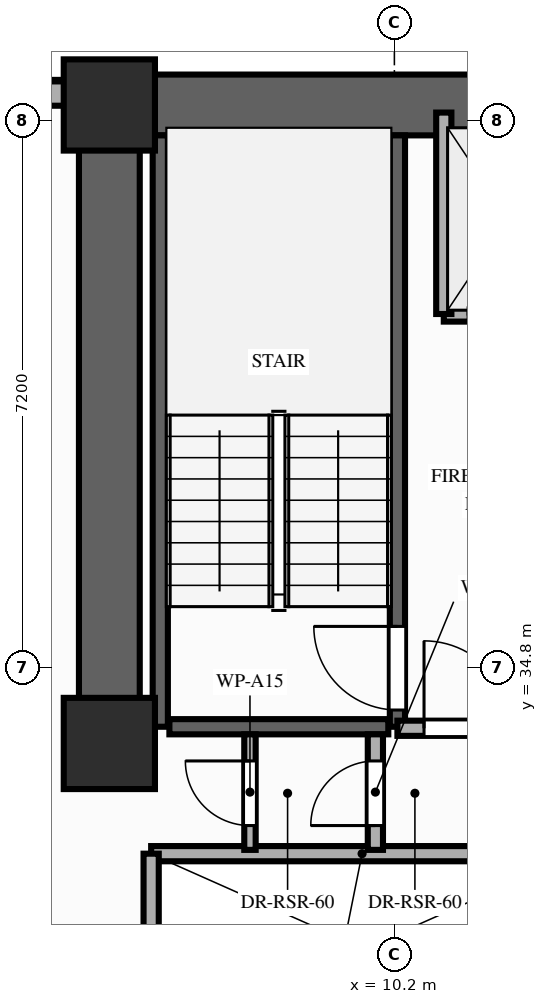
"""IFC4 building model, lengths in metres.
Left out: names, types, materials, properties, quantities, classifications, styles, units other than length and angle.
Written with IfcOpenShell. Run it as: python <this file> out.ifc"""

import sys

from ifc_helpers import new_model, si_unit, direction, frame, frame_2d, origin, origin_2d, place, context, subcontext, project, spatial, rectangle, extrude, element, fill, save


model = new_model("IFC4")
c1 = context("Model", 3, precision=1e-05, world=origin(), true_north=direction((0.0, 1.0)))
c2 = subcontext(c1, "Body", "Model", "MODEL_VIEW")
j1 = project(units=[si_unit("LENGTHUNIT", "METRE"), si_unit("PLANEANGLEUNIT", "RADIAN")], contexts=[c1])
p1 = place(None, origin())
s1 = spatial("IfcSite", under=j1, at=p1, CompositionType="ELEMENT")
p2 = place(p1, origin())
s2 = spatial("IfcBuilding", under=s1, at=p2, CompositionType="ELEMENT")
p3 = place(p2, frame((0.0, 0.0, 93.0)))
s3 = spatial("IfcBuildingStorey", under=s2, at=p3, CompositionType="ELEMENT", Elevation=93.0)
for number, where, z_axis, x_axis in (
    (1, (6.45, 33.8, 0.0), (0.0, 0.0, 1.0), (1.0, 0.0, 0.0)),
    (2, (6.45, 42.2, 0.0), (0.0, 0.0, 1.0), (1.0, 0.0, 0.0)),
):
    element("IfcColumn", number, at=place(p3, frame(where, z_axis=z_axis, x_axis=x_axis)), inside=s3, PredefinedType="COLUMN", context=c2, shape_type="SweptSolid", body=[
        extrude(rectangle(XDim=1.2, YDim=1.2, at=origin_2d()), origin(), (0.0, 0.0, 1.0), 3.2),
    ])
p4 = place(p3, frame((6.0, 42.35, 0.0), z_axis=(0.0, 0.0, 1.0), x_axis=(-1.0, 0.0, 0.0)))
e3 = element("IfcWall", 3, at=p4, inside=s3, PredefinedType="STANDARD", context=c2, shape_type="SweptSolid", body=[
    extrude(rectangle(XDim=2.0, YDim=0.32, at=frame_2d((1.0, 0.0))), origin(), (0.0, 0.0, 1.0), 3.02),
])
p5 = place(p3, frame((6.45, 42.2, 0.0), z_axis=(0.0, 0.0, 1.0), x_axis=(1.0, 0.0, 0.0)))
e4 = element("IfcWall", 4, at=p5, inside=s3, PredefinedType="SHEAR", context=c2, shape_type="SweptSolid", body=[
    extrude(rectangle(XDim=20.45, YDim=0.8, at=frame_2d((10.225, 0.0))), origin(), (0.0, 0.0, 1.0), 3.02),
])
p6 = place(p3, frame((6.45, 33.8, 0.0), z_axis=(0.0, 0.0, 1.0), x_axis=(0.0, 1.0, 0.0)))
e5 = element("IfcWall", 5, at=p6, inside=s3, PredefinedType="SHEAR", context=c2, shape_type="SweptSolid", body=[
    extrude(rectangle(XDim=7.95, YDim=0.8, at=frame_2d((3.975, 0.0))), origin(), (0.0, 0.0, 1.0), 3.02),
])
p7 = place(p3, frame((7.12, 34.02, 0.0), z_axis=(0.0, 0.0, 1.0), x_axis=(0.0, 1.0, 0.0)))
e6 = element("IfcWall", 6, at=p7, inside=s3, PredefinedType="SHEAR", context=c2, shape_type="SweptSolid", body=[
    extrude(rectangle(XDim=7.78, YDim=0.2, at=frame_2d((3.89, 0.0))), origin(), (0.0, 0.0, 1.0), 3.02),
])
p8 = place(p3, frame((10.24, 34.02, 0.0), z_axis=(0.0, 0.0, 1.0), x_axis=(0.0, 1.0, 0.0)))
e7 = element("IfcWall", 7, at=p8, inside=s3, PredefinedType="SHEAR", context=c2, shape_type="SweptSolid", body=[
    extrude(rectangle(XDim=7.78, YDim=0.2, at=frame_2d((3.89, 0.0))), origin(), (0.0, 0.0, 1.0), 3.02),
])
p9 = place(p8, frame((0.22, 0.0, 0.0)))
e8 = element("IfcOpeningElement", 8, at=p9, cuts=e7, PredefinedType="OPENING", context=c2, shape_type="SweptSolid", body=[
    extrude(rectangle(XDim=1.1, YDim=2.15, at=frame_2d((0.55, 1.075))), frame((0.0, 0.11, 0.0), z_axis=(0.0, -1.0, 0.0), x_axis=(1.0, 0.0, 0.0)), (0.0, 0.0, 1.0), 0.22),
])
p10 = place(p3, frame((7.24, 34.02, 0.0), z_axis=(0.0, 0.0, 1.0), x_axis=(1.0, 0.0, 0.0)))
e9 = element("IfcWall", 9, at=p10, inside=s3, PredefinedType="SHEAR", context=c2, shape_type="SweptSolid", body=[
    extrude(rectangle(XDim=2.88, YDim=0.2, at=frame_2d((1.44, 0.0))), origin(), (0.0, 0.0, 1.0), 3.02),
])
p11 = place(p3, frame((7.0, 32.35, 0.0), z_axis=(0.0, 0.0, 1.0), x_axis=(1.0, 0.0, 0.0)))
e10 = element("IfcWall", 10, at=p11, inside=s3, PredefinedType="MOVABLE", context=c2, shape_type="SweptSolid", body=[
    extrude(rectangle(XDim=5.55, YDim=0.2, at=frame_2d((2.775, 0.0))), origin(), (0.0, 0.0, 1.0), 3.02),
])
p12 = place(p3, frame((7.0, 29.85, 0.0), z_axis=(0.0, 0.0, 1.0), x_axis=(0.0, 1.0, 0.0)))
e11 = element("IfcWall", 11, at=p12, inside=s3, PredefinedType="MOVABLE", context=c2, shape_type="SweptSolid", body=[
    extrude(rectangle(XDim=2.5, YDim=0.2, at=frame_2d((1.25, 0.0))), origin(), (0.0, 0.0, 1.0), 3.02),
])
p13 = place(p3, frame((10.85, 39.45, 0.0), z_axis=(0.0, 0.0, 1.0), x_axis=(1.0, 0.0, 0.0)))
e12 = element("IfcWall", 12, at=p13, inside=s3, PredefinedType="MOVABLE", context=c2, shape_type="SweptSolid", body=[
    extrude(rectangle(XDim=1.7, YDim=0.2, at=frame_2d((0.85, 0.0))), origin(), (0.0, 0.0, 1.0), 3.02),
])
p14 = place(p13, frame((0.32, 0.0, 0.0)))
e13 = element("IfcOpeningElement", 13, at=p14, cuts=e12, PredefinedType="OPENING", context=c2, shape_type="SweptSolid", body=[
    extrude(rectangle(XDim=1.05, YDim=2.15, at=frame_2d((0.525, 1.075))), frame((0.0, 0.11, 0.0), z_axis=(0.0, -1.0, 0.0), x_axis=(1.0, 0.0, 0.0)), (0.0, 0.0, 1.0), 0.22),
])
p15 = place(p3, frame((10.85, 39.45, 0.0), z_axis=(0.0, 0.0, 1.0), x_axis=(0.0, 1.0, 0.0)))
e14 = element("IfcWall", 14, at=p15, inside=s3, PredefinedType="MOVABLE", context=c2, shape_type="SweptSolid", body=[
    extrude(rectangle(XDim=2.65, YDim=0.2, at=frame_2d((1.325, 0.0))), origin(), (0.0, 0.0, 1.0), 2.41),
])
p16 = place(p3, frame((10.24, 34.0, 0.0), z_axis=(0.0, 0.0, 1.0), x_axis=(1.0, 0.0, 0.0)))
e15 = element("IfcWall", 15, at=p16, inside=s3, PredefinedType="PARTITIONING", context=c2, shape_type="SweptSolid", body=[
    extrude(rectangle(XDim=2.66, YDim=0.2, at=frame_2d((1.33, 0.0))), origin(), (0.0, 0.0, 1.0), 2.41),
])
p17 = place(p16, frame((0.35, 0.0, 0.0)))
e16 = element("IfcOpeningElement", 16, at=p17, cuts=e15, PredefinedType="OPENING", context=c2, shape_type="SweptSolid", body=[
    extrude(rectangle(XDim=1.15, YDim=2.15, at=frame_2d((0.575, 1.075))), frame((0.0, 0.11, 0.0), z_axis=(0.0, -1.0, 0.0), x_axis=(1.0, 0.0, 0.0)), (0.0, 0.0, 1.0), 0.22),
])
p18 = place(p3, frame((9.95, 32.4, 0.0), z_axis=(0.0, 0.0, 1.0), x_axis=(0.0, 1.0, 0.0)))
e17 = element("IfcWall", 17, at=p18, inside=s3, PredefinedType="PARTITIONING", context=c2, shape_type="SweptSolid", body=[
    extrude(rectangle(XDim=1.52, YDim=0.2, at=frame_2d((0.76, 0.0))), origin(), (0.0, 0.0, 1.0), 2.41),
])
p19 = place(p18, frame((0.32, 0.0, 0.0)))
e18 = element("IfcOpeningElement", 18, at=p19, cuts=e17, PredefinedType="OPENING", context=c2, shape_type="SweptSolid", body=[
    extrude(rectangle(XDim=0.85, YDim=2.05, at=frame_2d((0.425, 1.025))), frame((0.0, 0.11, 0.0), z_axis=(0.0, -1.0, 0.0), x_axis=(1.0, 0.0, 0.0)), (0.0, 0.0, 1.0), 0.22),
])
p20 = place(p3, frame((8.3, 32.4, 0.0), z_axis=(0.0, 0.0, 1.0), x_axis=(0.0, 1.0, 0.0)))
e19 = element("IfcWall", 19, at=p20, inside=s3, PredefinedType="PARTITIONING", context=c2, shape_type="SweptSolid", body=[
    extrude(rectangle(XDim=1.52, YDim=0.15, at=frame_2d((0.76, 0.0))), origin(), (0.0, 0.0, 1.0), 2.41),
])
p21 = place(p20, frame((0.32, 0.0, 0.0)))
e20 = element("IfcOpeningElement", 20, at=p21, cuts=e19, PredefinedType="OPENING", context=c2, shape_type="SweptSolid", body=[
    extrude(rectangle(XDim=0.85, YDim=2.05, at=frame_2d((0.425, 1.025))), frame((0.0, 0.085, 0.0), z_axis=(0.0, -1.0, 0.0), x_axis=(1.0, 0.0, 0.0)), (0.0, 0.0, 1.0), 0.17),
])
p22 = place(p9, origin())
e21 = element("IfcDoor", 21, at=p22, inside=s3, OperationType="SINGLE_SWING_RIGHT", PredefinedType="DOOR", context=c2, shape_type="SweptSolid", body=[
    extrude(rectangle(XDim=1.1, YDim=2.15, at=frame_2d((0.55, 1.075))), frame((0.0, 0.025, 0.0), z_axis=(0.0, -1.0, 0.0), x_axis=(1.0, 0.0, 0.0)), (0.0, 0.0, 1.0), 0.05),
])
fill(e8, e21)
p23 = place(p17, origin())
e22 = element("IfcDoor", 22, at=p23, inside=s3, OperationType="SINGLE_SWING_LEFT", PredefinedType="DOOR", context=c2, shape_type="SweptSolid", body=[
    extrude(rectangle(XDim=1.15, YDim=2.15, at=frame_2d((0.575, 1.075))), frame((0.0, 0.025, 0.0), z_axis=(0.0, -1.0, 0.0), x_axis=(1.0, 0.0, 0.0)), (0.0, 0.0, 1.0), 0.05),
])
fill(e16, e22)
p24 = place(p19, origin())
e23 = element("IfcDoor", 23, at=p24, inside=s3, OperationType="SINGLE_SWING_LEFT", PredefinedType="DOOR", context=c2, shape_type="SweptSolid", body=[
    extrude(rectangle(XDim=0.85, YDim=2.05, at=frame_2d((0.425, 1.025))), frame((0.0, 0.025, 0.0), z_axis=(0.0, -1.0, 0.0), x_axis=(1.0, 0.0, 0.0)), (0.0, 0.0, 1.0), 0.05),
])
fill(e18, e23)
p25 = place(p21, origin())
e24 = element("IfcDoor", 24, at=p25, inside=s3, OperationType="SINGLE_SWING_RIGHT", PredefinedType="DOOR", context=c2, shape_type="SweptSolid", body=[
    extrude(rectangle(XDim=0.85, YDim=2.05, at=frame_2d((0.425, 1.025))), frame((0.0, 0.025, 0.0), z_axis=(0.0, -1.0, 0.0), x_axis=(1.0, 0.0, 0.0)), (0.0, 0.0, 1.0), 0.05),
])
fill(e20, e24)
save(model, sys.argv[1])
